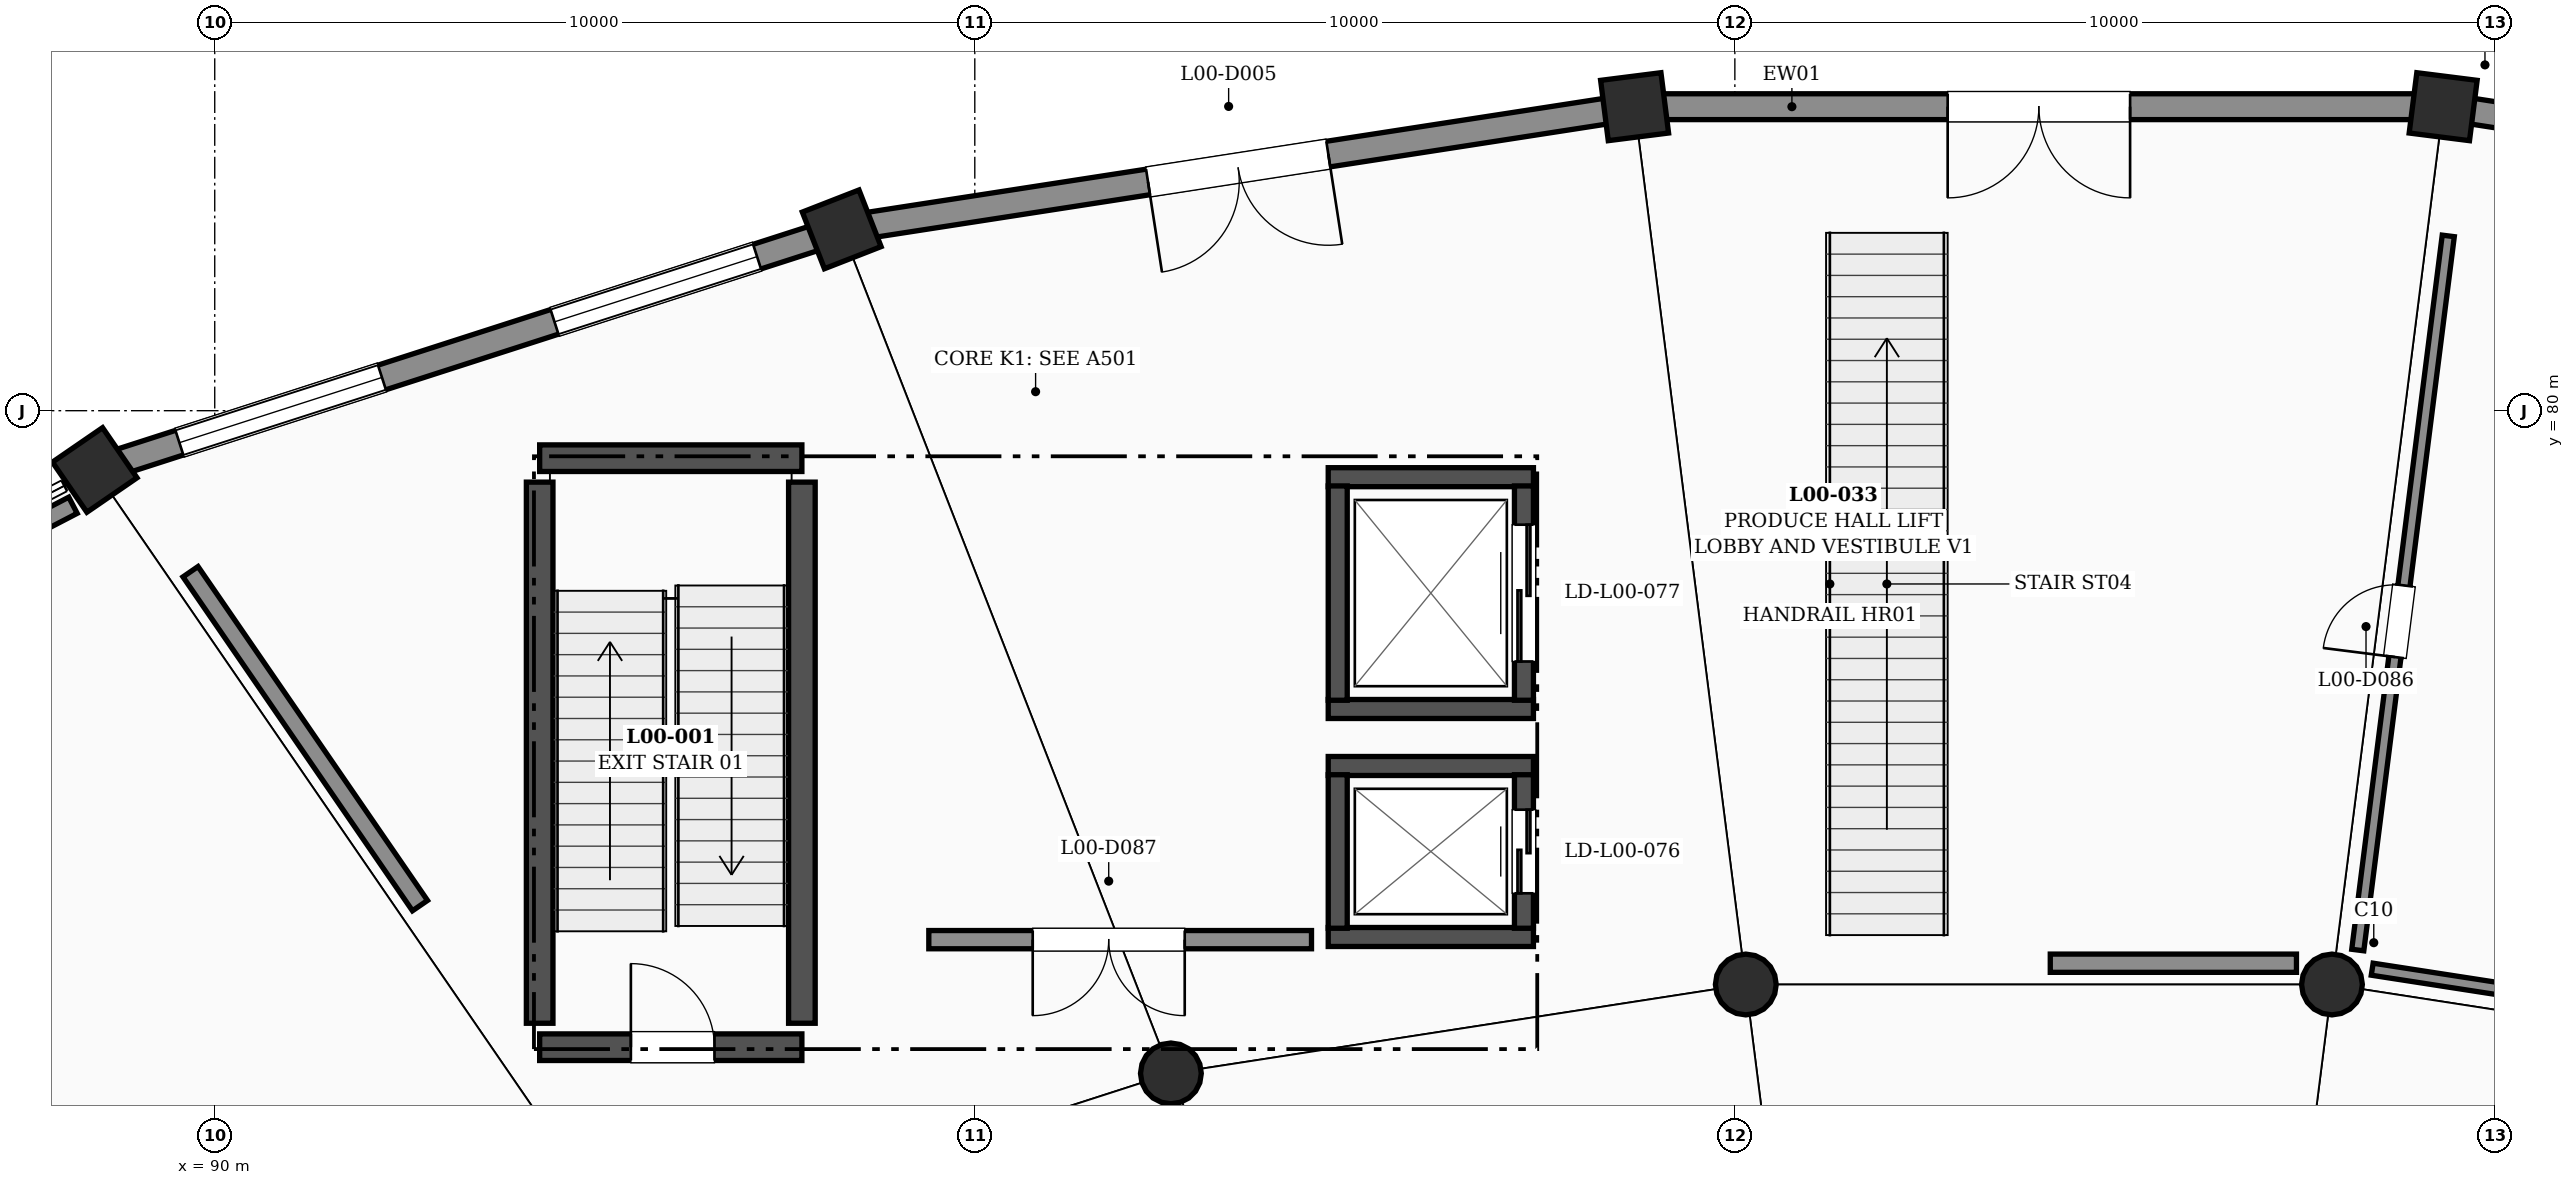
"""IFC4 building model, lengths in metres.
Left out: names, types, materials, properties, quantities, classifications, styles, units other than length and angle.
Written with IfcOpenShell. Run it as: python <this file> out.ifc"""

import sys

from ifc_helpers import new_model, si_unit, direction, frame, frame_2d, origin, origin_2d, place, context, subcontext, project, spatial, rectangle, circle, extrude, element, fill, save


model = new_model("IFC4")
c1 = context("Model", 3, precision=1e-05, world=origin(), true_north=direction((0.0, 1.0)))
c2 = subcontext(c1, "Body", "Model", "MODEL_VIEW")
j1 = project(units=[si_unit("LENGTHUNIT", "METRE"), si_unit("PLANEANGLEUNIT", "RADIAN")], contexts=[c1])
p1 = place(None, origin())
s1 = spatial("IfcSite", under=j1, at=p1, CompositionType="ELEMENT")
p2 = place(p1, origin())
s2 = spatial("IfcBuilding", under=s1, at=p2, CompositionType="ELEMENT")
p3 = place(p2, origin())
s3 = spatial("IfcBuildingStorey", under=s2, at=p3, CompositionType="ELEMENT", Elevation=0.0)
p4 = place(p3, frame((119.319, 84.0, 0.0), z_axis=(0.0, 0.0, 1.0), x_axis=(-0.992070891321, 0.125679539283, 0.0)))
e1 = element("IfcColumn", 1, at=p4, inside=s3, PredefinedType="COLUMN", context=c2, shape_type="SweptSolid", body=[
    extrude(rectangle(XDim=0.8, YDim=0.8, at=origin_2d()), origin(), (0.0, 0.0, 1.0), 6.0),
])
p5 = place(p3, frame((117.856, 72.45, 0.0), z_axis=(0.0, 0.0, 1.0), x_axis=(1.0, 0.0, 0.0)))
e2 = element("IfcColumn", 2, at=p5, inside=s3, PredefinedType="COLUMN", context=c2, shape_type="SweptSolid", body=[
    extrude(circle(Radius=0.4, at=origin_2d()), origin(), (0.0, 0.0, 1.0), 6.0),
])
p6 = place(p3, frame((108.681, 84.0, 0.0), z_axis=(0.0, 0.0, 1.0), x_axis=(0.992070891321, 0.125679539283, 0.0)))
e3 = element("IfcColumn", 3, at=p6, inside=s3, PredefinedType="COLUMN", context=c2, shape_type="SweptSolid", body=[
    extrude(rectangle(XDim=0.8, YDim=0.8, at=origin_2d()), origin(), (0.0, 0.0, 1.0), 6.0),
])
p7 = place(p3, frame((110.144, 72.45, 0.0), z_axis=(0.0, 0.0, 1.0), x_axis=(1.0, 0.0, 0.0)))
e4 = element("IfcColumn", 4, at=p7, inside=s3, PredefinedType="COLUMN", context=c2, shape_type="SweptSolid", body=[
    extrude(circle(Radius=0.4, at=origin_2d()), origin(), (0.0, 0.0, 1.0), 6.0),
])
p8 = place(p3, frame((98.249, 82.386, 0.0), z_axis=(0.0, 0.0, 1.0), x_axis=(0.931627814096, 0.363413835735, 0.0)))
e5 = element("IfcColumn", 5, at=p8, inside=s3, PredefinedType="COLUMN", context=c2, shape_type="SweptSolid", body=[
    extrude(rectangle(XDim=0.8, YDim=0.8, at=origin_2d()), origin(), (0.0, 0.0, 1.0), 6.0),
])
p9 = place(p3, frame((102.58, 71.28, 0.0), z_axis=(0.0, 0.0, 1.0), x_axis=(1.0, 0.0, 0.0)))
e6 = element("IfcColumn", 6, at=p9, inside=s3, PredefinedType="COLUMN", context=c2, shape_type="SweptSolid", body=[
    extrude(circle(Radius=0.4, at=origin_2d()), origin(), (0.0, 0.0, 1.0), 6.0),
])
p10 = place(p3, frame((88.421, 79.22, 0.0), z_axis=(0.0, 0.0, 1.0), x_axis=(0.824126188622, 0.566406236925, 0.0)))
e7 = element("IfcColumn", 7, at=p10, inside=s3, PredefinedType="COLUMN", context=c2, shape_type="SweptSolid", body=[
    extrude(rectangle(XDim=0.8, YDim=0.8, at=origin_2d()), origin(), (0.0, 0.0, 1.0), 6.0),
])
p11 = place(p3, frame((129.484, 82.427, 0.0), z_axis=(0.0, 0.0, 1.0), x_axis=(-0.988241433344, 0.152901502352, 0.0)))
e8 = element("IfcWall", 8, at=p11, inside=s3, PredefinedType="SOLIDWALL", context=c2, shape_type="SweptSolid", body=[
    extrude(rectangle(XDim=10.016, YDim=0.34, at=frame_2d((5.008, 0.0))), origin(), (0.0, 0.0, 1.0), 4.83),
])
p12 = place(p11, frame((0.9, 0.0, 1.05)))
e9 = element("IfcOpeningElement", 9, at=p12, cuts=e8, PredefinedType="OPENING", context=c2, shape_type="SweptSolid", body=[
    extrude(rectangle(XDim=2.8, YDim=2.4, at=frame_2d((1.4, 1.2))), frame((0.0, 0.18, 0.0), z_axis=(0.0, -1.0, 0.0), x_axis=(1.0, 0.0, 0.0)), (0.0, 0.0, 1.0), 0.36),
])
p13 = place(p11, frame((6.316, 0.0, 1.05)))
e10 = element("IfcOpeningElement", 10, at=p13, cuts=e8, PredefinedType="OPENING", context=c2, shape_type="SweptSolid", body=[
    extrude(rectangle(XDim=2.8, YDim=2.4, at=frame_2d((1.4, 1.2))), frame((0.0, 0.18, 0.0), z_axis=(0.0, -1.0, 0.0), x_axis=(1.0, 0.0, 0.0)), (0.0, 0.0, 1.0), 0.36),
])
p14 = place(p3, frame((119.049, 84.0, 0.0), z_axis=(0.0, 0.0, 1.0), x_axis=(-1.0, 0.0, 0.0)))
e11 = element("IfcWall", 11, at=p14, inside=s3, PredefinedType="SOLIDWALL", context=c2, shape_type="SweptSolid", body=[
    extrude(rectangle(XDim=10.098, YDim=0.34, at=frame_2d((5.049, 0.0))), origin(), (0.0, 0.0, 1.0), 4.83),
])
p15 = place(p14, frame((3.849, 0.0, 0.0)))
e12 = element("IfcOpeningElement", 12, at=p15, cuts=e11, PredefinedType="OPENING", context=c2, shape_type="SweptSolid", body=[
    extrude(rectangle(XDim=2.4, YDim=2.6, at=frame_2d((1.2, 1.3))), frame((0.0, 0.18, 0.0), z_axis=(0.0, -1.0, 0.0), x_axis=(1.0, 0.0, 0.0)), (0.0, 0.0, 1.0), 0.36),
])
p16 = place(p3, frame((108.414, 83.959, 0.0), z_axis=(0.0, 0.0, 1.0), x_axis=(-0.988241433344, -0.152901502352, 0.0)))
e13 = element("IfcWall", 13, at=p16, inside=s3, PredefinedType="SOLIDWALL", context=c2, shape_type="SweptSolid", body=[
    extrude(rectangle(XDim=10.016, YDim=0.34, at=frame_2d((5.008, 0.0))), origin(), (0.0, 0.0, 1.0), 4.83),
])
p17 = place(p16, frame((3.808, 0.0, 0.0)))
e14 = element("IfcOpeningElement", 14, at=p17, cuts=e13, PredefinedType="OPENING", context=c2, shape_type="SweptSolid", body=[
    extrude(rectangle(XDim=2.4, YDim=2.6, at=frame_2d((1.2, 1.3))), frame((0.0, 0.18, 0.0), z_axis=(0.0, -1.0, 0.0), x_axis=(1.0, 0.0, 0.0)), (0.0, 0.0, 1.0), 0.36),
])
p18 = place(p3, frame((97.992, 82.303, 0.0), z_axis=(0.0, 0.0, 1.0), x_axis=(-0.95182847269, -0.30663098111, 0.0)))
e15 = element("IfcWall", 15, at=p18, inside=s3, PredefinedType="SOLIDWALL", context=c2, shape_type="SweptSolid", body=[
    extrude(rectangle(XDim=9.785, YDim=0.34, at=frame_2d((4.893, 0.0))), origin(), (0.0, 0.0, 1.0), 4.83),
])
p19 = place(p18, frame((0.9, 0.0, 1.05)))
e16 = element("IfcOpeningElement", 16, at=p19, cuts=e15, PredefinedType="OPENING", context=c2, shape_type="SweptSolid", body=[
    extrude(rectangle(XDim=2.8, YDim=2.4, at=frame_2d((1.4, 1.2))), frame((0.0, 0.18, 0.0), z_axis=(0.0, -1.0, 0.0), x_axis=(1.0, 0.0, 0.0)), (0.0, 0.0, 1.0), 0.36),
])
p20 = place(p18, frame((6.085, 0.0, 1.05)))
e17 = element("IfcOpeningElement", 17, at=p20, cuts=e15, PredefinedType="OPENING", context=c2, shape_type="SweptSolid", body=[
    extrude(rectangle(XDim=2.8, YDim=2.4, at=frame_2d((1.4, 1.2))), frame((0.0, 0.18, 0.0), z_axis=(0.0, -1.0, 0.0), x_axis=(1.0, 0.0, 0.0)), (0.0, 0.0, 1.0), 0.36),
])
p21 = place(p3, frame((94.275, 71.625, 0.0), z_axis=(0.0, 0.0, 1.0), x_axis=(1.0, 0.0, 0.0)))
e18 = element("IfcWall", 18, at=p21, inside=s3, PredefinedType="SHEAR", context=c2, shape_type="SweptSolid", body=[
    extrude(rectangle(XDim=3.45, YDim=0.35, at=frame_2d((1.725, 0.0))), origin(), (0.0, 0.0, 1.0), 6.0),
])
p22 = place(p21, frame((1.2, 0.0, 0.0)))
e19 = element("IfcOpeningElement", 19, at=p22, cuts=e18, PredefinedType="OPENING", context=c2, shape_type="SweptSolid", body=[
    extrude(rectangle(XDim=1.1, YDim=2.2, at=frame_2d((0.55, 1.1))), frame((0.0, 0.185, 0.0), z_axis=(0.0, -1.0, 0.0), x_axis=(1.0, 0.0, 0.0)), (0.0, 0.0, 1.0), 0.37),
])
p23 = place(p3, frame((94.275, 79.375, 0.0), z_axis=(0.0, 0.0, 1.0), x_axis=(1.0, 0.0, 0.0)))
e20 = element("IfcWall", 20, at=p23, inside=s3, PredefinedType="SHEAR", context=c2, shape_type="SweptSolid", body=[
    extrude(rectangle(XDim=3.45, YDim=0.35, at=frame_2d((1.725, 0.0))), origin(), (0.0, 0.0, 1.0), 6.0),
])
for number, where, z_axis, x_axis in (
    (21, (94.275, 71.94, 0.0), (0.0, 0.0, 1.0), (0.0, 1.0, 0.0)),
    (22, (97.725, 71.94, 0.0), (0.0, 0.0, 1.0), (0.0, 1.0, 0.0)),
):
    element("IfcWall", number, at=place(p3, frame(where, z_axis=z_axis, x_axis=x_axis)), inside=s3, PredefinedType="SHEAR", context=c2, shape_type="SweptSolid", body=[
        extrude(rectangle(XDim=7.12, YDim=0.35, at=frame_2d((3.56, 0.0))), origin(), (0.0, 0.0, 1.0), 6.0),
    ])
for number, where, z_axis, x_axis in (
    (23, (104.65, 73.075, 0.0), (0.0, 0.0, 1.0), (1.0, 0.0, 0.0)),
    (24, (104.65, 75.325, 0.0), (0.0, 0.0, 1.0), (1.0, 0.0, 0.0)),
):
    element("IfcWall", number, at=place(p3, frame(where, z_axis=z_axis, x_axis=x_axis)), inside=s3, PredefinedType="SHEAR", context=c2, shape_type="SweptSolid", body=[
        extrude(rectangle(XDim=2.7, YDim=0.25, at=frame_2d((1.35, 0.0))), origin(), (0.0, 0.0, 1.0), 6.0),
    ])
p24 = place(p3, frame((104.775, 73.19, 0.0), z_axis=(0.0, 0.0, 1.0), x_axis=(0.0, 1.0, 0.0)))
e25 = element("IfcWall", 25, at=p24, inside=s3, PredefinedType="SHEAR", context=c2, shape_type="SweptSolid", body=[
    extrude(rectangle(XDim=2.02, YDim=0.25, at=frame_2d((1.01, 0.0))), origin(), (0.0, 0.0, 1.0), 6.0),
])
p25 = place(p3, frame((107.225, 73.19, 0.0), z_axis=(0.0, 0.0, 1.0), x_axis=(0.0, 1.0, 0.0)))
e26 = element("IfcWall", 26, at=p25, inside=s3, PredefinedType="SHEAR", context=c2, shape_type="SweptSolid", body=[
    extrude(rectangle(XDim=2.02, YDim=0.25, at=frame_2d((1.01, 0.0))), origin(), (0.0, 0.0, 1.0), 6.0),
])
p26 = place(p25, frame((0.46, 0.0, 0.0)))
e27 = element("IfcOpeningElement", 27, at=p26, cuts=e26, PredefinedType="OPENING", context=c2, shape_type="SweptSolid", body=[
    extrude(rectangle(XDim=1.1, YDim=2.2, at=frame_2d((0.55, 1.1))), frame((0.0, 0.135, 0.0), z_axis=(0.0, -1.0, 0.0), x_axis=(1.0, 0.0, 0.0)), (0.0, 0.0, 1.0), 0.27),
])
for number, where, z_axis, x_axis in (
    (28, (104.65, 76.075, 0.0), (0.0, 0.0, 1.0), (1.0, 0.0, 0.0)),
    (29, (104.65, 79.125, 0.0), (0.0, 0.0, 1.0), (1.0, 0.0, 0.0)),
):
    element("IfcWall", number, at=place(p3, frame(where, z_axis=z_axis, x_axis=x_axis)), inside=s3, PredefinedType="SHEAR", context=c2, shape_type="SweptSolid", body=[
        extrude(rectangle(XDim=2.7, YDim=0.25, at=frame_2d((1.35, 0.0))), origin(), (0.0, 0.0, 1.0), 6.0),
    ])
p27 = place(p3, frame((104.775, 76.19, 0.0), z_axis=(0.0, 0.0, 1.0), x_axis=(0.0, 1.0, 0.0)))
e30 = element("IfcWall", 30, at=p27, inside=s3, PredefinedType="SHEAR", context=c2, shape_type="SweptSolid", body=[
    extrude(rectangle(XDim=2.82, YDim=0.25, at=frame_2d((1.41, 0.0))), origin(), (0.0, 0.0, 1.0), 6.0),
])
p28 = place(p3, frame((107.225, 76.19, 0.0), z_axis=(0.0, 0.0, 1.0), x_axis=(0.0, 1.0, 0.0)))
e31 = element("IfcWall", 31, at=p28, inside=s3, PredefinedType="SHEAR", context=c2, shape_type="SweptSolid", body=[
    extrude(rectangle(XDim=2.82, YDim=0.25, at=frame_2d((1.41, 0.0))), origin(), (0.0, 0.0, 1.0), 6.0),
])
p29 = place(p28, frame((0.51, 0.0, 0.0)))
e32 = element("IfcOpeningElement", 32, at=p29, cuts=e31, PredefinedType="OPENING", context=c2, shape_type="SweptSolid", body=[
    extrude(rectangle(XDim=1.8, YDim=2.4, at=frame_2d((0.9, 1.2))), frame((0.0, 0.135, 0.0), z_axis=(0.0, -1.0, 0.0), x_axis=(1.0, 0.0, 0.0)), (0.0, 0.0, 1.0), 0.27),
])
p30 = place(p3, frame((125.265, 71.587, 0.0), z_axis=(0.0, 0.0, 1.0), x_axis=(-0.988233842636, 0.152950554982, 0.0)))
e33 = element("IfcWall", 33, at=p30, inside=s3, PredefinedType="PARTITIONING", context=c2, shape_type="SweptSolid", body=[
    extrude(rectangle(XDim=6.961, YDim=0.16, at=frame_2d((3.48, 0.0))), origin(), (0.0, 0.0, 1.0), 4.78),
])
p31 = place(p3, frame((118.196, 72.903, 0.0), z_axis=(0.0, 0.0, 1.0), x_axis=(0.125684233178, 0.992070296668, 0.0)))
e34 = element("IfcWall", 34, at=p31, inside=s3, PredefinedType="PARTITIONING", context=c2, shape_type="SweptSolid", body=[
    extrude(rectangle(XDim=9.472, YDim=0.16, at=frame_2d((4.736, 0.0))), origin(), (0.0, 0.0, 1.0), 4.78),
])
p32 = place(p31, frame((3.886, 0.0, 0.0)))
e35 = element("IfcOpeningElement", 35, at=p32, cuts=e34, PredefinedType="OPENING", context=c2, shape_type="SweptSolid", body=[
    extrude(rectangle(XDim=0.95, YDim=2.15, at=frame_2d((0.475, 1.075))), frame((0.0, 0.09, 0.0), z_axis=(0.0, -1.0, 0.0), x_axis=(1.0, 0.0, 0.0)), (0.0, 0.0, 1.0), 0.18),
])
p33 = place(p3, frame((117.389, 72.73, 0.0), z_axis=(0.0, 0.0, 1.0), x_axis=(-1.0, 0.0, 0.0)))
e36 = element("IfcWall", 36, at=p33, inside=s3, PredefinedType="PARTITIONING", context=c2, shape_type="SweptSolid", body=[
    extrude(rectangle(XDim=3.239, YDim=0.24, at=frame_2d((1.62, 0.0))), origin(), (0.0, 0.0, 1.0), 4.78),
])
p34 = place(p3, frame((104.43, 73.04, 0.0), z_axis=(0.0, 0.0, 1.0), x_axis=(-1.0, 0.0, 0.0)))
e37 = element("IfcWall", 37, at=p34, inside=s3, PredefinedType="PARTITIONING", context=c2, shape_type="SweptSolid", body=[
    extrude(rectangle(XDim=5.035, YDim=0.24, at=frame_2d((2.518, 0.0))), origin(), (0.0, 0.0, 1.0), 4.78),
])
p35 = place(p34, frame((1.668, 0.0, 0.0)))
e38 = element("IfcOpeningElement", 38, at=p35, cuts=e37, PredefinedType="OPENING", context=c2, shape_type="SweptSolid", body=[
    extrude(rectangle(XDim=2.0, YDim=2.35, at=frame_2d((1.0, 1.175))), frame((0.0, 0.13, 0.0), z_axis=(0.0, -1.0, 0.0), x_axis=(1.0, 0.0, 0.0)), (0.0, 0.0, 1.0), 0.26),
])
p36 = place(p3, frame((92.7, 73.488, 0.0), z_axis=(0.0, 0.0, 1.0), x_axis=(-0.566355817311, 0.824160838792, 0.0)))
e39 = element("IfcWall", 39, at=p36, inside=s3, PredefinedType="PARTITIONING", context=c2, shape_type="SweptSolid", body=[
    extrude(rectangle(XDim=5.331, YDim=0.24, at=frame_2d((2.665, 0.0))), origin(), (0.0, 0.0, 1.0), 4.78),
])
p37 = place(p3, frame((79.924, 74.489, 0.0), z_axis=(0.0, 0.0, 1.0), x_axis=(0.887320457096, 0.461153343715, 0.0)))
e40 = element("IfcWall", 40, at=p37, inside=s3, PredefinedType="PARTITIONING", context=c2, shape_type="SweptSolid", body=[
    extrude(rectangle(XDim=9.253, YDim=0.24, at=frame_2d((4.626, 0.0))), origin(), (0.0, 0.0, 1.0), 4.83),
])
p38 = place(p15, origin())
e41 = element("IfcDoor", 41, at=p38, inside=s3, OperationType="DOUBLE_DOOR_SINGLE_SWING", PredefinedType="DOOR", context=c2, shape_type="SweptSolid", body=[
    extrude(rectangle(XDim=2.4, YDim=2.6, at=frame_2d((1.2, 1.3))), frame((0.0, 0.025, 0.0), z_axis=(0.0, -1.0, 0.0), x_axis=(1.0, 0.0, 0.0)), (0.0, 0.0, 1.0), 0.05),
])
fill(e12, e41)
p39 = place(p17, origin())
e42 = element("IfcDoor", 42, at=p39, inside=s3, OperationType="DOUBLE_DOOR_SINGLE_SWING", PredefinedType="DOOR", context=c2, shape_type="SweptSolid", body=[
    extrude(rectangle(XDim=2.4, YDim=2.6, at=frame_2d((1.2, 1.3))), frame((0.0, 0.025, 0.0), z_axis=(0.0, -1.0, 0.0), x_axis=(1.0, 0.0, 0.0)), (0.0, 0.0, 1.0), 0.05),
])
fill(e14, e42)
p40 = place(p19, origin())
e43 = element("IfcWindow", 43, at=p40, inside=s3, PartitioningType="SINGLE_PANEL", PredefinedType="WINDOW", context=c2, shape_type="SweptSolid", body=[
    extrude(rectangle(XDim=2.8, YDim=2.4, at=frame_2d((1.4, 1.2))), frame((0.0, 0.03, 0.0), z_axis=(0.0, -1.0, 0.0), x_axis=(1.0, 0.0, 0.0)), (0.0, 0.0, 1.0), 0.06),
])
fill(e16, e43)
p41 = place(p20, origin())
e44 = element("IfcWindow", 44, at=p41, inside=s3, PartitioningType="SINGLE_PANEL", PredefinedType="WINDOW", context=c2, shape_type="SweptSolid", body=[
    extrude(rectangle(XDim=2.8, YDim=2.4, at=frame_2d((1.4, 1.2))), frame((0.0, 0.03, 0.0), z_axis=(0.0, -1.0, 0.0), x_axis=(1.0, 0.0, 0.0)), (0.0, 0.0, 1.0), 0.06),
])
fill(e17, e44)
p42 = place(p22, origin())
e45 = element("IfcDoor", 45, at=p42, inside=s3, OperationType="SINGLE_SWING_LEFT", PredefinedType="DOOR", context=c2, shape_type="SweptSolid", body=[
    extrude(rectangle(XDim=1.1, YDim=2.2, at=frame_2d((0.55, 1.1))), frame((0.0, 0.025, 0.0), z_axis=(0.0, -1.0, 0.0), x_axis=(1.0, 0.0, 0.0)), (0.0, 0.0, 1.0), 0.05),
])
fill(e19, e45)
p43 = place(p26, origin())
e46 = element("IfcDoor", 46, at=p43, inside=s3, OperationType="DOUBLE_DOOR_SLIDING", PredefinedType="DOOR", context=c2, shape_type="SweptSolid", body=[
    extrude(rectangle(XDim=1.1, YDim=2.2, at=frame_2d((0.55, 1.1))), frame((0.0, 0.025, 0.0), z_axis=(0.0, -1.0, 0.0), x_axis=(1.0, 0.0, 0.0)), (0.0, 0.0, 1.0), 0.05),
])
fill(e27, e46)
p44 = place(p29, origin())
e47 = element("IfcDoor", 47, at=p44, inside=s3, OperationType="DOUBLE_DOOR_SLIDING", PredefinedType="DOOR", context=c2, shape_type="SweptSolid", body=[
    extrude(rectangle(XDim=1.8, YDim=2.4, at=frame_2d((0.9, 1.2))), frame((0.0, 0.025, 0.0), z_axis=(0.0, -1.0, 0.0), x_axis=(1.0, 0.0, 0.0)), (0.0, 0.0, 1.0), 0.05),
])
fill(e32, e47)
p45 = place(p32, origin())
e48 = element("IfcDoor", 48, at=p45, inside=s3, OperationType="SINGLE_SWING_LEFT", PredefinedType="DOOR", context=c2, shape_type="SweptSolid", body=[
    extrude(rectangle(XDim=0.95, YDim=2.15, at=frame_2d((0.475, 1.075))), frame((0.0, 0.025, 0.0), z_axis=(0.0, -1.0, 0.0), x_axis=(1.0, 0.0, 0.0)), (0.0, 0.0, 1.0), 0.05),
])
fill(e35, e48)
p46 = place(p35, origin())
e49 = element("IfcDoor", 49, at=p46, inside=s3, OperationType="DOUBLE_DOOR_SINGLE_SWING", PredefinedType="DOOR", context=c2, shape_type="SweptSolid", body=[
    extrude(rectangle(XDim=2.0, YDim=2.35, at=frame_2d((1.0, 1.175))), frame((0.0, 0.025, 0.0), z_axis=(0.0, -1.0, 0.0), x_axis=(1.0, 0.0, 0.0)), (0.0, 0.0, 1.0), 0.05),
])
fill(e38, e49)
save(model, sys.argv[1])
